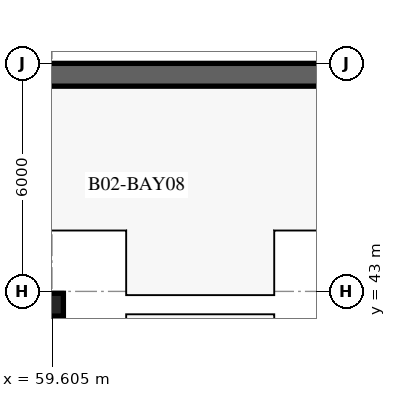
"""IFC4 building model, lengths in metres.
Left out: names, types, materials, properties, quantities, classifications, styles, units other than length and angle.
Written with IfcOpenShell. Run it as: python <this file> out.ifc"""

import sys

from ifc_helpers import new_model, si_unit, direction, frame, frame_2d, origin, origin_2d, place, context, subcontext, project, spatial, rectangle, extrude, element, save


model = new_model("IFC4")
c1 = context("Model", 3, precision=1e-05, world=origin(), true_north=direction((0.0, 1.0)))
c2 = subcontext(c1, "Body", "Model", "MODEL_VIEW")
j1 = project(units=[si_unit("LENGTHUNIT", "METRE"), si_unit("PLANEANGLEUNIT", "RADIAN")], contexts=[c1])
p1 = place(None, origin())
s1 = spatial("IfcSite", under=j1, at=p1, CompositionType="ELEMENT")
p2 = place(p1, origin())
s2 = spatial("IfcBuilding", under=s1, at=p2, CompositionType="ELEMENT")
p3 = place(p2, frame((0.0, 0.0, -8.4)))
s3 = spatial("IfcBuildingStorey", under=s2, at=p3, CompositionType="ELEMENT", Elevation=-8.4)
p4 = place(p3, frame((75.0, 48.7, 0.0), z_axis=(0.0, 0.0, 1.0), x_axis=(-1.0, 0.0, 0.0)))
e1 = element("IfcWall", 1, at=p4, inside=s3, PredefinedType="USERDEFINED", context=c2, shape_type="SweptSolid", body=[
    extrude(rectangle(XDim=74.0, YDim=0.6, at=frame_2d((37.0, 0.0))), origin(), (0.0, 0.0, 1.0), 3.88),
])
p5 = place(p3, frame((59.6, 42.65, 0.0), z_axis=(0.0, 0.0, 1.0), x_axis=(1.0, 0.0, 0.0)))
e2 = element("IfcColumn", 2, at=p5, inside=s3, PredefinedType="COLUMN", context=c2, shape_type="SweptSolid", body=[
    extrude(rectangle(XDim=0.6, YDim=0.6, at=origin_2d()), origin(), (0.0, 0.0, 1.0), 4.2),
])
save(model, sys.argv[1])
